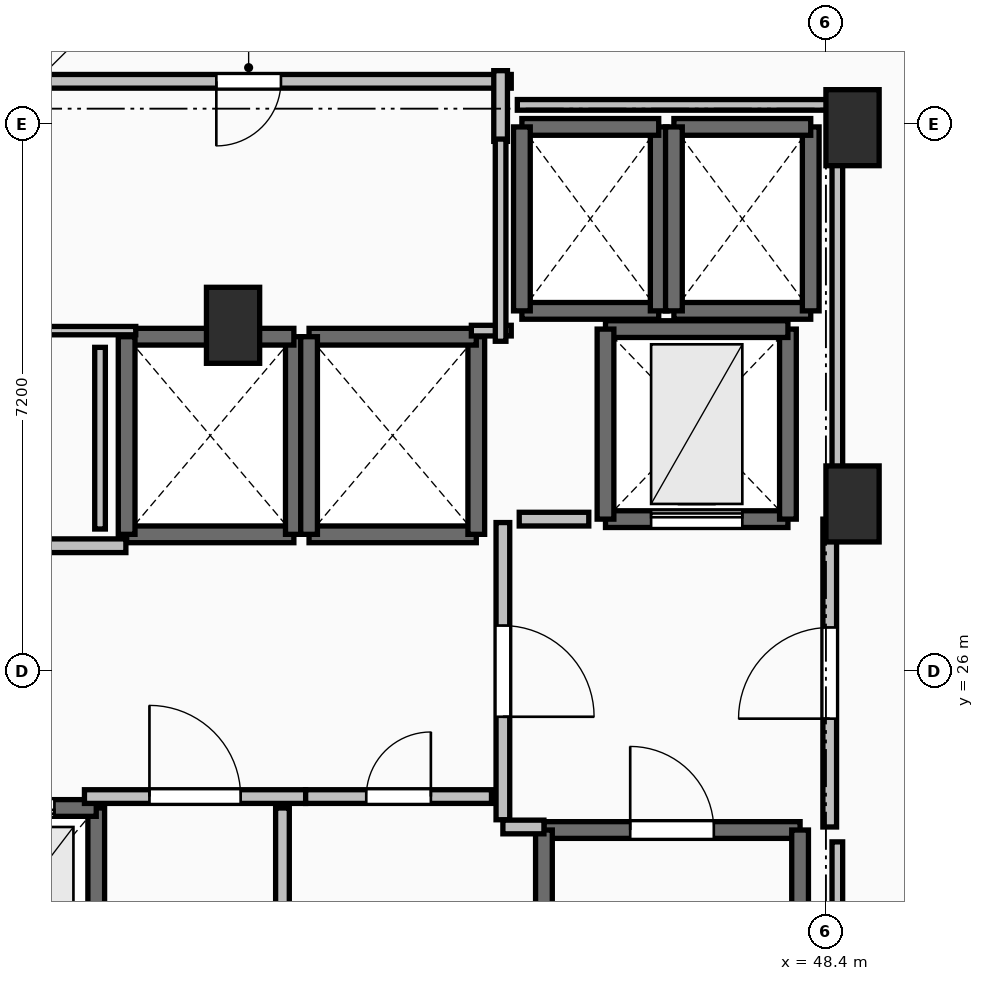
"""IFC4 building model, lengths in metres.
Left out: names, types, materials, properties, quantities, classifications, styles, units other than length and angle.
Written with IfcOpenShell. Run it as: python <this file> out.ifc"""

import sys

from ifc_helpers import new_model, si_unit, direction, frame, frame_2d, origin, origin_2d, place, context, subcontext, project, spatial, rectangle, extrude, element, fill, save


model = new_model("IFC4")
c1 = context("Model", 3, precision=1e-05, world=origin(), true_north=direction((0.0, 1.0)))
c2 = subcontext(c1, "Body", "Model", "MODEL_VIEW")
j1 = project(units=[si_unit("LENGTHUNIT", "METRE"), si_unit("PLANEANGLEUNIT", "RADIAN")], contexts=[c1])
p1 = place(None, origin())
s1 = spatial("IfcSite", under=j1, at=p1, CompositionType="ELEMENT")
p2 = place(p1, origin())
s2 = spatial("IfcBuilding", under=s1, at=p2, CompositionType="ELEMENT")
p3 = place(p2, frame((0.0, 0.0, 207.2)))
s3 = spatial("IfcBuildingStorey", under=s2, at=p3, CompositionType="ELEMENT", Elevation=207.2)
for number, where, z_axis, x_axis in (
    (1, (48.75, 33.15, 0.0), (0.0, 0.0, 1.0), (1.0, 0.0, 0.0)),
    (2, (48.75, 28.2, 0.0), (0.0, 0.0, 1.0), (1.0, 0.0, 0.0)),
    (3, (40.6, 30.55, 0.0), (0.0, 0.0, 1.0), (1.0, 0.0, 0.0)),
):
    element("IfcColumn", number, at=place(p3, frame(where, z_axis=z_axis, x_axis=x_axis)), inside=s3, PredefinedType="PILASTER", context=c2, shape_type="SweptSolid", body=[
        extrude(rectangle(XDim=0.7, YDim=1.0, at=origin_2d()), origin(), (0.0, 0.0, 1.0), 3.55),
    ])
p4 = place(p3, frame((44.69, 23.91, 0.0), z_axis=(0.0, 0.0, 1.0), x_axis=(1.0, 0.0, 0.0)))
e4 = element("IfcWall", 4, at=p4, inside=s3, PredefinedType="SOLIDWALL", context=c2, shape_type="SweptSolid", body=[
    extrude(rectangle(XDim=3.37, YDim=0.22, at=frame_2d((1.685, 0.0))), origin(), (0.0, 0.0, 1.0), 3.29),
])
p5 = place(p4, frame((1.135, 0.0, 0.0)))
e5 = element("IfcOpeningElement", 5, at=p5, cuts=e4, PredefinedType="OPENING", context=c2, shape_type="SweptSolid", body=[
    extrude(rectangle(XDim=1.1, YDim=2.15, at=frame_2d((0.55, 1.075))), frame((0.0, 0.125, 0.0), z_axis=(0.0, -1.0, 0.0), x_axis=(1.0, 0.0, 0.0)), (0.0, 0.0, 1.0), 0.25),
])
for number, where, z_axis, x_axis in (
    (6, (48.06, 23.91, 0.0), (0.0, 0.0, 1.0), (0.0, -1.0, 0.0)),
    (7, (44.69, 16.49, 0.0), (0.0, 0.0, 1.0), (0.0, 1.0, 0.0)),
):
    element("IfcWall", number, at=place(p3, frame(where, z_axis=z_axis, x_axis=x_axis)), inside=s3, PredefinedType="SOLIDWALL", context=c2, shape_type="SweptSolid", body=[
        extrude(rectangle(XDim=7.42, YDim=0.22, at=frame_2d((3.71, 0.0))), origin(), (0.0, 0.0, 1.0), 3.29),
    ])
p6 = place(p3, frame((38.8, 21.6, 0.0), z_axis=(0.0, 0.0, 1.0), x_axis=(0.0, 1.0, 0.0)))
e8 = element("IfcWall", 8, at=p6, inside=s3, PredefinedType="SOLIDWALL", context=c2, shape_type="SweptSolid", body=[
    extrude(rectangle(XDim=2.6, YDim=0.22, at=frame_2d((1.3, 0.0))), origin(), (0.0, 0.0, 1.0), 3.29),
])
p7 = place(p3, frame((38.8, 24.2, 0.0), z_axis=(0.0, 0.0, 1.0), x_axis=(-1.0, 0.0, 0.0)))
e9 = element("IfcWall", 9, at=p7, inside=s3, PredefinedType="SOLIDWALL", context=c2, shape_type="SweptSolid", body=[
    extrude(rectangle(XDim=2.2, YDim=0.22, at=frame_2d((1.1, 0.0))), origin(), (0.0, 0.0, 1.0), 3.29),
])
p8 = place(p7, frame((0.55, 0.0, 0.0)))
e10 = element("IfcOpeningElement", 10, at=p8, cuts=e9, PredefinedType="OPENING", context=c2, shape_type="SweptSolid", body=[
    extrude(rectangle(XDim=1.1, YDim=2.2, at=frame_2d((0.55, 1.1))), frame((0.0, 0.125, 0.0), z_axis=(0.0, -1.0, 0.0), x_axis=(1.0, 0.0, 0.0)), (0.0, 0.0, 1.0), 0.25),
])
p9 = place(p3, frame((39.2, 27.8, 0.0), z_axis=(0.0, 0.0, 1.0), x_axis=(1.0, 0.0, 0.0)))
e11 = element("IfcWall", 11, at=p9, inside=s3, PredefinedType="SOLIDWALL", context=c2, shape_type="SweptSolid", body=[
    extrude(rectangle(XDim=2.2, YDim=0.22, at=frame_2d((1.1, 0.0))), origin(), (0.0, 0.0, 1.0), 3.29),
])
p10 = place(p3, frame((41.4, 27.8, 0.0), z_axis=(0.0, 0.0, 1.0), x_axis=(0.0, 1.0, 0.0)))
e12 = element("IfcWall", 12, at=p10, inside=s3, PredefinedType="SOLIDWALL", context=c2, shape_type="SweptSolid", body=[
    extrude(rectangle(XDim=2.6, YDim=0.22, at=frame_2d((1.3, 0.0))), origin(), (0.0, 0.0, 1.0), 3.29),
])
p11 = place(p3, frame((41.4, 30.4, 0.0), z_axis=(0.0, 0.0, 1.0), x_axis=(-1.0, 0.0, 0.0)))
e13 = element("IfcWall", 13, at=p11, inside=s3, PredefinedType="SOLIDWALL", context=c2, shape_type="SweptSolid", body=[
    extrude(rectangle(XDim=2.2, YDim=0.22, at=frame_2d((1.1, 0.0))), origin(), (0.0, 0.0, 1.0), 3.29),
])
p12 = place(p3, frame((39.2, 30.4, 0.0), z_axis=(0.0, 0.0, 1.0), x_axis=(0.0, -1.0, 0.0)))
e14 = element("IfcWall", 14, at=p12, inside=s3, PredefinedType="SOLIDWALL", context=c2, shape_type="SweptSolid", body=[
    extrude(rectangle(XDim=2.6, YDim=0.22, at=frame_2d((1.3, 0.0))), origin(), (0.0, 0.0, 1.0), 3.29),
])
p13 = place(p3, frame((41.6, 27.8, 0.0), z_axis=(0.0, 0.0, 1.0), x_axis=(1.0, 0.0, 0.0)))
e15 = element("IfcWall", 15, at=p13, inside=s3, PredefinedType="SOLIDWALL", context=c2, shape_type="SweptSolid", body=[
    extrude(rectangle(XDim=2.2, YDim=0.22, at=frame_2d((1.1, 0.0))), origin(), (0.0, 0.0, 1.0), 3.29),
])
p14 = place(p3, frame((43.8, 27.8, 0.0), z_axis=(0.0, 0.0, 1.0), x_axis=(0.0, 1.0, 0.0)))
e16 = element("IfcWall", 16, at=p14, inside=s3, PredefinedType="SOLIDWALL", context=c2, shape_type="SweptSolid", body=[
    extrude(rectangle(XDim=2.6, YDim=0.22, at=frame_2d((1.3, 0.0))), origin(), (0.0, 0.0, 1.0), 3.29),
])
p15 = place(p3, frame((43.8, 30.4, 0.0), z_axis=(0.0, 0.0, 1.0), x_axis=(-1.0, 0.0, 0.0)))
e17 = element("IfcWall", 17, at=p15, inside=s3, PredefinedType="SOLIDWALL", context=c2, shape_type="SweptSolid", body=[
    extrude(rectangle(XDim=2.2, YDim=0.22, at=frame_2d((1.1, 0.0))), origin(), (0.0, 0.0, 1.0), 3.29),
])
p16 = place(p3, frame((41.6, 30.4, 0.0), z_axis=(0.0, 0.0, 1.0), x_axis=(0.0, -1.0, 0.0)))
e18 = element("IfcWall", 18, at=p16, inside=s3, PredefinedType="SOLIDWALL", context=c2, shape_type="SweptSolid", body=[
    extrude(rectangle(XDim=2.6, YDim=0.22, at=frame_2d((1.3, 0.0))), origin(), (0.0, 0.0, 1.0), 3.29),
])
p17 = place(p3, frame((44.4, 30.74, 0.0), z_axis=(0.0, 0.0, 1.0), x_axis=(1.0, 0.0, 0.0)))
e19 = element("IfcWall", 19, at=p17, inside=s3, PredefinedType="SOLIDWALL", context=c2, shape_type="SweptSolid", body=[
    extrude(rectangle(XDim=1.8, YDim=0.22, at=frame_2d((0.9, 0.0))), origin(), (0.0, 0.0, 1.0), 3.29),
])
p18 = place(p3, frame((46.2, 30.74, 0.0), z_axis=(0.0, 0.0, 1.0), x_axis=(0.0, 1.0, 0.0)))
e20 = element("IfcWall", 20, at=p18, inside=s3, PredefinedType="SOLIDWALL", context=c2, shape_type="SweptSolid", body=[
    extrude(rectangle(XDim=2.42, YDim=0.22, at=frame_2d((1.21, 0.0))), origin(), (0.0, 0.0, 1.0), 3.29),
])
p19 = place(p3, frame((46.2, 33.16, 0.0), z_axis=(0.0, 0.0, 1.0), x_axis=(-1.0, 0.0, 0.0)))
e21 = element("IfcWall", 21, at=p19, inside=s3, PredefinedType="SOLIDWALL", context=c2, shape_type="SweptSolid", body=[
    extrude(rectangle(XDim=1.8, YDim=0.22, at=frame_2d((0.9, 0.0))), origin(), (0.0, 0.0, 1.0), 3.29),
])
p20 = place(p3, frame((44.4, 33.16, 0.0), z_axis=(0.0, 0.0, 1.0), x_axis=(0.0, -1.0, 0.0)))
e22 = element("IfcWall", 22, at=p20, inside=s3, PredefinedType="SOLIDWALL", context=c2, shape_type="SweptSolid", body=[
    extrude(rectangle(XDim=2.42, YDim=0.22, at=frame_2d((1.21, 0.0))), origin(), (0.0, 0.0, 1.0), 3.29),
])
p21 = place(p3, frame((46.4, 30.74, 0.0), z_axis=(0.0, 0.0, 1.0), x_axis=(1.0, 0.0, 0.0)))
e23 = element("IfcWall", 23, at=p21, inside=s3, PredefinedType="SOLIDWALL", context=c2, shape_type="SweptSolid", body=[
    extrude(rectangle(XDim=1.8, YDim=0.22, at=frame_2d((0.9, 0.0))), origin(), (0.0, 0.0, 1.0), 3.29),
])
p22 = place(p3, frame((48.2, 30.74, 0.0), z_axis=(0.0, 0.0, 1.0), x_axis=(0.0, 1.0, 0.0)))
e24 = element("IfcWall", 24, at=p22, inside=s3, PredefinedType="SOLIDWALL", context=c2, shape_type="SweptSolid", body=[
    extrude(rectangle(XDim=2.42, YDim=0.22, at=frame_2d((1.21, 0.0))), origin(), (0.0, 0.0, 1.0), 3.29),
])
p23 = place(p3, frame((48.2, 33.16, 0.0), z_axis=(0.0, 0.0, 1.0), x_axis=(-1.0, 0.0, 0.0)))
e25 = element("IfcWall", 25, at=p23, inside=s3, PredefinedType="SOLIDWALL", context=c2, shape_type="SweptSolid", body=[
    extrude(rectangle(XDim=1.8, YDim=0.22, at=frame_2d((0.9, 0.0))), origin(), (0.0, 0.0, 1.0), 3.29),
])
p24 = place(p3, frame((46.4, 33.16, 0.0), z_axis=(0.0, 0.0, 1.0), x_axis=(0.0, -1.0, 0.0)))
e26 = element("IfcWall", 26, at=p24, inside=s3, PredefinedType="SOLIDWALL", context=c2, shape_type="SweptSolid", body=[
    extrude(rectangle(XDim=2.42, YDim=0.22, at=frame_2d((1.21, 0.0))), origin(), (0.0, 0.0, 1.0), 3.29),
])
p25 = place(p3, frame((45.5, 28.0, 0.0), z_axis=(0.0, 0.0, 1.0), x_axis=(1.0, 0.0, 0.0)))
e27 = element("IfcWall", 27, at=p25, inside=s3, PredefinedType="SHEAR", context=c2, shape_type="SweptSolid", body=[
    extrude(rectangle(XDim=2.4, YDim=0.22, at=frame_2d((1.2, 0.0))), origin(), (0.0, 0.0, 1.0), 3.29),
])
p26 = place(p25, frame((0.6, 0.0, 0.0)))
e28 = element("IfcOpeningElement", 28, at=p26, cuts=e27, PredefinedType="OPENING", context=c2, shape_type="SweptSolid", body=[
    extrude(rectangle(XDim=1.2, YDim=2.2, at=frame_2d((0.6, 1.1))), frame((0.0, 0.125, 0.0), z_axis=(0.0, -1.0, 0.0), x_axis=(1.0, 0.0, 0.0)), (0.0, 0.0, 1.0), 0.25),
])
p27 = place(p3, frame((47.9, 28.0, 0.0), z_axis=(0.0, 0.0, 1.0), x_axis=(0.0, 1.0, 0.0)))
e29 = element("IfcWall", 29, at=p27, inside=s3, PredefinedType="SHEAR", context=c2, shape_type="SweptSolid", body=[
    extrude(rectangle(XDim=2.5, YDim=0.22, at=frame_2d((1.25, 0.0))), origin(), (0.0, 0.0, 1.0), 3.29),
])
p28 = place(p3, frame((47.9, 30.5, 0.0), z_axis=(0.0, 0.0, 1.0), x_axis=(-1.0, 0.0, 0.0)))
e30 = element("IfcWall", 30, at=p28, inside=s3, PredefinedType="SHEAR", context=c2, shape_type="SweptSolid", body=[
    extrude(rectangle(XDim=2.4, YDim=0.22, at=frame_2d((1.2, 0.0))), origin(), (0.0, 0.0, 1.0), 3.29),
])
p29 = place(p3, frame((45.5, 30.5, 0.0), z_axis=(0.0, 0.0, 1.0), x_axis=(0.0, -1.0, 0.0)))
e31 = element("IfcWall", 31, at=p29, inside=s3, PredefinedType="SHEAR", context=c2, shape_type="SweptSolid", body=[
    extrude(rectangle(XDim=2.5, YDim=0.22, at=frame_2d((1.25, 0.0))), origin(), (0.0, 0.0, 1.0), 3.29),
])
p30 = place(p3, frame((44.15, 27.955, 0.0), z_axis=(0.0, 0.0, 1.0), x_axis=(0.0, -1.0, 0.0)))
e32 = element("IfcWall", 32, at=p30, inside=s3, PredefinedType="PARTITIONING", context=c2, shape_type="SweptSolid", body=[
    extrude(rectangle(XDim=3.91, YDim=0.18, at=frame_2d((1.955, 0.0))), origin(), (0.0, 0.0, 1.0), 3.29),
])
p31 = place(p30, frame((1.355, 0.0, 0.0)))
e33 = element("IfcOpeningElement", 33, at=p31, cuts=e32, PredefinedType="OPENING", context=c2, shape_type="SweptSolid", body=[
    extrude(rectangle(XDim=1.2, YDim=2.15, at=frame_2d((0.6, 1.075))), frame((0.0, 0.105, 0.0), z_axis=(0.0, -1.0, 0.0), x_axis=(1.0, 0.0, 0.0)), (0.0, 0.0, 1.0), 0.21),
])
p32 = place(p3, frame((44.15, 23.95, 0.0), z_axis=(0.0, 0.0, 1.0), x_axis=(1.0, 0.0, 0.0)))
e34 = element("IfcWall", 34, at=p32, inside=s3, PredefinedType="PARTITIONING", context=c2, shape_type="SweptSolid", body=[
    extrude(rectangle(XDim=0.54, YDim=0.18, at=frame_2d((0.27, 0.0))), origin(), (0.0, 0.0, 1.0), 3.29),
])
p33 = place(p3, frame((48.45, 23.95, 0.0), z_axis=(0.0, 0.0, 1.0), x_axis=(0.0, 1.0, 0.0)))
e35 = element("IfcWall", 35, at=p33, inside=s3, PredefinedType="PARTITIONING", context=c2, shape_type="SweptSolid", body=[
    extrude(rectangle(XDim=4.05, YDim=0.18, at=frame_2d((2.025, 0.0))), origin(), (0.0, 0.0, 1.0), 3.29),
])
p34 = place(p33, frame((1.425, 0.0, 0.0)))
e36 = element("IfcOpeningElement", 36, at=p34, cuts=e35, PredefinedType="OPENING", context=c2, shape_type="SweptSolid", body=[
    extrude(rectangle(XDim=1.2, YDim=2.15, at=frame_2d((0.6, 1.075))), frame((0.0, 0.105, 0.0), z_axis=(0.0, -1.0, 0.0), x_axis=(1.0, 0.0, 0.0)), (0.0, 0.0, 1.0), 0.21),
])
p35 = place(p3, frame((38.645, 24.35, 0.0), z_axis=(0.0, 0.0, 1.0), x_axis=(1.0, 0.0, 0.0)))
e37 = element("IfcWall", 37, at=p35, inside=s3, PredefinedType="PARTITIONING", context=c2, shape_type="SweptSolid", body=[
    extrude(rectangle(XDim=2.91, YDim=0.18, at=frame_2d((1.455, 0.0))), origin(), (0.0, 0.0, 1.0), 3.29),
])
p36 = place(p35, frame((0.855, 0.0, 0.0)))
e38 = element("IfcOpeningElement", 38, at=p36, cuts=e37, PredefinedType="OPENING", context=c2, shape_type="SweptSolid", body=[
    extrude(rectangle(XDim=1.2, YDim=2.15, at=frame_2d((0.6, 1.075))), frame((0.0, 0.105, 0.0), z_axis=(0.0, -1.0, 0.0), x_axis=(1.0, 0.0, 0.0)), (0.0, 0.0, 1.0), 0.21),
])
p37 = place(p3, frame((41.555, 24.35, 0.0), z_axis=(0.0, 0.0, 1.0), x_axis=(1.0, 0.0, 0.0)))
e39 = element("IfcWall", 39, at=p37, inside=s3, PredefinedType="PARTITIONING", context=c2, shape_type="SweptSolid", body=[
    extrude(rectangle(XDim=2.445, YDim=0.18, at=frame_2d((1.223, 0.0))), origin(), (0.0, 0.0, 1.0), 3.29),
])
p38 = place(p37, frame((0.798, 0.0, 0.0)))
e40 = element("IfcOpeningElement", 40, at=p38, cuts=e39, PredefinedType="OPENING", context=c2, shape_type="SweptSolid", body=[
    extrude(rectangle(XDim=0.85, YDim=2.1, at=frame_2d((0.425, 1.05))), frame((0.0, 0.105, 0.0), z_axis=(0.0, -1.0, 0.0), x_axis=(1.0, 0.0, 0.0)), (0.0, 0.0, 1.0), 0.21),
])
p39 = place(p3, frame((39.19, 27.65, 0.0), z_axis=(0.0, 0.0, 1.0), x_axis=(-1.0, 0.0, 0.0)))
e41 = element("IfcWall", 41, at=p39, inside=s3, PredefinedType="PARTITIONING", context=c2, shape_type="SweptSolid", body=[
    extrude(rectangle(XDim=7.19, YDim=0.18, at=frame_2d((3.595, 0.0))), origin(), (0.0, 0.0, 1.0), 3.29),
])
p40 = place(p39, frame((3.095, 0.0, 0.0)))
e42 = element("IfcOpeningElement", 42, at=p40, cuts=e41, PredefinedType="OPENING", context=c2, shape_type="SweptSolid", body=[
    extrude(rectangle(XDim=1.0, YDim=2.15, at=frame_2d((0.5, 1.075))), frame((0.0, 0.105, 0.0), z_axis=(0.0, -1.0, 0.0), x_axis=(1.0, 0.0, 0.0)), (0.0, 0.0, 1.0), 0.21),
])
p41 = place(p3, frame((41.25, 20.305, 0.0), z_axis=(0.0, 0.0, 1.0), x_axis=(0.0, 1.0, 0.0)))
e43 = element("IfcWall", 43, at=p41, inside=s3, PredefinedType="PARTITIONING", context=c2, shape_type="SweptSolid", body=[
    extrude(rectangle(XDim=3.895, YDim=0.18, at=frame_2d((1.948, 0.0))), origin(), (0.0, 0.0, 1.0), 3.29),
])
p42 = place(p41, frame((1.522, 0.0, 0.0)))
e44 = element("IfcOpeningElement", 44, at=p42, cuts=e43, PredefinedType="OPENING", context=c2, shape_type="SweptSolid", body=[
    extrude(rectangle(XDim=0.85, YDim=2.1, at=frame_2d((0.425, 1.05))), frame((0.0, 0.105, 0.0), z_axis=(0.0, -1.0, 0.0), x_axis=(1.0, 0.0, 0.0)), (0.0, 0.0, 1.0), 0.21),
])
p43 = place(p3, frame((37.365, 30.48, 0.0), z_axis=(0.0, 0.0, 1.0), x_axis=(1.0, 0.0, 0.0)))
e45 = element("IfcWall", 45, at=p43, inside=s3, PredefinedType="PARTITIONING", context=c2, shape_type="SweptSolid", body=[
    extrude(rectangle(XDim=1.955, YDim=0.11, at=frame_2d((0.978, 0.0))), origin(), (0.0, 0.0, 1.0), 2.482),
])
p44 = place(p3, frame((44.26, 33.76, 0.0), z_axis=(0.0, 0.0, 1.0), x_axis=(-1.0, 0.0, 0.0)))
e46 = element("IfcWall", 46, at=p44, inside=s3, PredefinedType="PARTITIONING", context=c2, shape_type="SweptSolid", body=[
    extrude(rectangle(XDim=6.91, YDim=0.18, at=frame_2d((3.455, 0.0))), origin(), (0.0, 0.0, 1.0), 3.29),
])
p45 = place(p44, frame((3.03, 0.0, 0.0)))
e47 = element("IfcOpeningElement", 47, at=p45, cuts=e46, PredefinedType="OPENING", context=c2, shape_type="SweptSolid", body=[
    extrude(rectangle(XDim=0.85, YDim=2.1, at=frame_2d((0.425, 1.05))), frame((0.0, 0.105, 0.0), z_axis=(0.0, -1.0, 0.0), x_axis=(1.0, 0.0, 0.0)), (0.0, 0.0, 1.0), 0.21),
])
p46 = place(p3, frame((44.12, 32.97, 0.0), z_axis=(0.0, 0.0, 1.0), x_axis=(0.0, 1.0, 0.0)))
e48 = element("IfcWall", 48, at=p46, inside=s3, PredefinedType="PARTITIONING", context=c2, shape_type="SweptSolid", body=[
    extrude(rectangle(XDim=0.93, YDim=0.18, at=frame_2d((0.465, 0.0))), origin(), (0.0, 0.0, 1.0), 3.29),
])
p47 = place(p3, frame((45.28, 28.0, 0.0), z_axis=(0.0, 0.0, 1.0), x_axis=(-1.0, 0.0, 0.0)))
e49 = element("IfcWall", 49, at=p47, inside=s3, PredefinedType="PARTITIONING", context=c2, shape_type="SweptSolid", body=[
    extrude(rectangle(XDim=0.915, YDim=0.18, at=frame_2d((0.458, 0.0))), origin(), (0.0, 0.0, 1.0), 3.29),
])
p48 = place(p3, frame((43.735, 30.48, 0.0), z_axis=(0.0, 0.0, 1.0), x_axis=(1.0, 0.0, 0.0)))
e50 = element("IfcWall", 50, at=p48, inside=s3, PredefinedType="PARTITIONING", context=c2, shape_type="SweptSolid", body=[
    extrude(rectangle(XDim=0.525, YDim=0.14, at=frame_2d((0.262, 0.0))), origin(), (0.0, 0.0, 1.0), 3.29),
])
p49 = place(p3, frame((44.12, 30.34, 0.0), z_axis=(0.0, 0.0, 1.0), x_axis=(0.0, 1.0, 0.0)))
e51 = element("IfcWall", 51, at=p49, inside=s3, PredefinedType="PARTITIONING", context=c2, shape_type="SweptSolid", body=[
    extrude(rectangle(XDim=2.66, YDim=0.14, at=frame_2d((1.33, 0.0))), origin(), (0.0, 0.0, 1.0), 3.29),
])
p50 = place(p3, frame((38.85, 27.87, 0.0), z_axis=(0.0, 0.0, 1.0), x_axis=(0.0, 1.0, 0.0)))
e52 = element("IfcWall", 52, at=p50, inside=s3, PredefinedType="PARTITIONING", context=c2, shape_type="SweptSolid", body=[
    extrude(rectangle(XDim=2.39, YDim=0.14, at=frame_2d((1.195, 0.0))), origin(), (0.0, 0.0, 1.0), 3.29),
])
p51 = place(p3, frame((48.55, 16.24, 0.0), z_axis=(0.0, 0.0, 1.0), x_axis=(0.0, 1.0, 0.0)))
e53 = element("IfcWall", 53, at=p51, inside=s3, PredefinedType="PARTITIONING", context=c2, shape_type="SweptSolid", body=[
    extrude(rectangle(XDim=7.514, YDim=0.14, at=frame_2d((3.757, 0.0))), origin(), (0.0, 0.0, 1.0), 2.482),
])
p52 = place(p3, frame((48.55, 28.196, 0.0), z_axis=(0.0, 0.0, 1.0), x_axis=(0.0, 1.0, 0.0)))
e54 = element("IfcWall", 54, at=p52, inside=s3, PredefinedType="PARTITIONING", context=c2, shape_type="SweptSolid", body=[
    extrude(rectangle(XDim=5.254, YDim=0.14, at=frame_2d((2.627, 0.0))), origin(), (0.0, 0.0, 1.0), 2.482),
])
p53 = place(p3, frame((48.55, 33.45, 0.0), z_axis=(0.0, 0.0, 1.0), x_axis=(-1.0, 0.0, 0.0)))
e55 = element("IfcWall", 55, at=p53, inside=s3, PredefinedType="PARTITIONING", context=c2, shape_type="SweptSolid", body=[
    extrude(rectangle(XDim=4.21, YDim=0.14, at=frame_2d((2.105, 0.0))), origin(), (0.0, 0.0, 1.0), 2.482),
])
p54 = place(p5, origin())
e56 = element("IfcDoor", 56, at=p54, inside=s3, OperationType="SINGLE_SWING_LEFT", PredefinedType="DOOR", context=c2, shape_type="SweptSolid", body=[
    extrude(rectangle(XDim=1.1, YDim=2.15, at=frame_2d((0.55, 1.075))), frame((0.0, 0.025, 0.0), z_axis=(0.0, -1.0, 0.0), x_axis=(1.0, 0.0, 0.0)), (0.0, 0.0, 1.0), 0.05),
])
fill(e5, e56)
p55 = place(p8, origin())
e57 = element("IfcDoor", 57, at=p55, inside=s3, OperationType="SLIDING_TO_LEFT", PredefinedType="DOOR", context=c2, shape_type="SweptSolid", body=[
    extrude(rectangle(XDim=1.1, YDim=2.2, at=frame_2d((0.55, 1.1))), frame((0.0, 0.025, 0.0), z_axis=(0.0, -1.0, 0.0), x_axis=(1.0, 0.0, 0.0)), (0.0, 0.0, 1.0), 0.05),
])
fill(e10, e57)
p56 = place(p26, origin())
e58 = element("IfcDoor", 58, at=p56, inside=s3, OperationType="SLIDING_TO_LEFT", PredefinedType="DOOR", context=c2, shape_type="SweptSolid", body=[
    extrude(rectangle(XDim=1.2, YDim=2.2, at=frame_2d((0.6, 1.1))), frame((0.0, 0.025, 0.0), z_axis=(0.0, -1.0, 0.0), x_axis=(1.0, 0.0, 0.0)), (0.0, 0.0, 1.0), 0.05),
])
fill(e28, e58)
p57 = place(p31, origin())
e59 = element("IfcDoor", 59, at=p57, inside=s3, OperationType="SINGLE_SWING_RIGHT", PredefinedType="DOOR", context=c2, shape_type="SweptSolid", body=[
    extrude(rectangle(XDim=1.2, YDim=2.15, at=frame_2d((0.6, 1.075))), frame((0.0, 0.025, 0.0), z_axis=(0.0, -1.0, 0.0), x_axis=(1.0, 0.0, 0.0)), (0.0, 0.0, 1.0), 0.05),
])
fill(e33, e59)
p58 = place(p34, origin())
e60 = element("IfcDoor", 60, at=p58, inside=s3, OperationType="SINGLE_SWING_LEFT", PredefinedType="DOOR", context=c2, shape_type="SweptSolid", body=[
    extrude(rectangle(XDim=1.2, YDim=2.15, at=frame_2d((0.6, 1.075))), frame((0.0, 0.025, 0.0), z_axis=(0.0, -1.0, 0.0), x_axis=(1.0, 0.0, 0.0)), (0.0, 0.0, 1.0), 0.05),
])
fill(e36, e60)
p59 = place(p36, origin())
e61 = element("IfcDoor", 61, at=p59, inside=s3, OperationType="SINGLE_SWING_LEFT", PredefinedType="DOOR", context=c2, shape_type="SweptSolid", body=[
    extrude(rectangle(XDim=1.2, YDim=2.15, at=frame_2d((0.6, 1.075))), frame((0.0, 0.025, 0.0), z_axis=(0.0, -1.0, 0.0), x_axis=(1.0, 0.0, 0.0)), (0.0, 0.0, 1.0), 0.05),
])
fill(e38, e61)
p60 = place(p38, origin())
e62 = element("IfcDoor", 62, at=p60, inside=s3, OperationType="SINGLE_SWING_RIGHT", PredefinedType="DOOR", context=c2, shape_type="SweptSolid", body=[
    extrude(rectangle(XDim=0.85, YDim=2.1, at=frame_2d((0.425, 1.05))), frame((0.0, 0.025, 0.0), z_axis=(0.0, -1.0, 0.0), x_axis=(1.0, 0.0, 0.0)), (0.0, 0.0, 1.0), 0.05),
])
fill(e40, e62)
p61 = place(p45, origin())
e63 = element("IfcDoor", 63, at=p61, inside=s3, OperationType="SINGLE_SWING_RIGHT", PredefinedType="DOOR", context=c2, shape_type="SweptSolid", body=[
    extrude(rectangle(XDim=0.85, YDim=2.1, at=frame_2d((0.425, 1.05))), frame((0.0, 0.025, 0.0), z_axis=(0.0, -1.0, 0.0), x_axis=(1.0, 0.0, 0.0)), (0.0, 0.0, 1.0), 0.05),
])
fill(e47, e63)
save(model, sys.argv[1])
